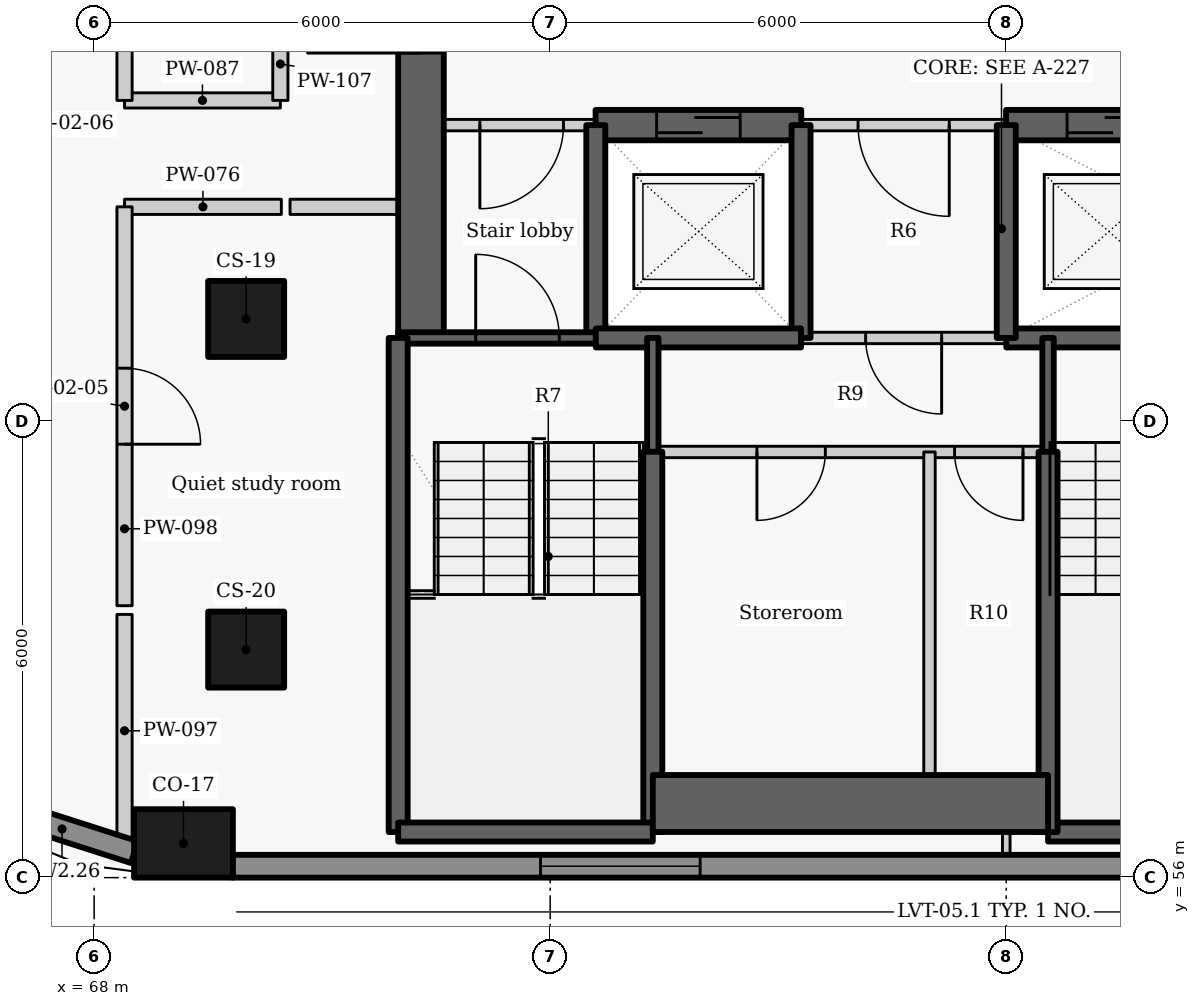
"""IFC4 building model, lengths in metres.
Left out: names, types, materials, properties, quantities, classifications, styles, units other than length and angle.
Written with IfcOpenShell. Run it as: python <this file> out.ifc"""

import sys

from ifc_helpers import new_model, si_unit, direction, frame, frame_2d, origin, origin_2d, place, context, subcontext, project, spatial, rectangle, extrude, element, fill, save


model = new_model("IFC4")
c1 = context("Model", 3, precision=1e-05, world=origin(), true_north=direction((0.0, 1.0)))
c2 = subcontext(c1, "Body", "Model", "MODEL_VIEW")
j1 = project(units=[si_unit("LENGTHUNIT", "METRE"), si_unit("PLANEANGLEUNIT", "RADIAN")], contexts=[c1])
p1 = place(None, origin())
s1 = spatial("IfcSite", under=j1, at=p1, CompositionType="ELEMENT")
p2 = place(p1, origin())
s2 = spatial("IfcBuilding", under=s1, at=p2, CompositionType="ELEMENT")
p3 = place(p2, frame((0.0, 0.0, 150.3)))
s3 = spatial("IfcBuildingStorey", under=s2, at=p3, CompositionType="ELEMENT", Elevation=150.3)
p4 = place(p3, frame((69.175, 56.45, 0.0), z_axis=(0.0, 0.0, 1.0), x_axis=(1.0, 0.0, 0.0)))
e1 = element("IfcColumn", 1, at=p4, inside=s3, PredefinedType="COLUMN", context=c2, shape_type="SweptSolid", body=[
    extrude(rectangle(XDim=1.3, YDim=0.9, at=origin_2d()), origin(), (0.0, 0.0, 1.0), 3.3),
])
for number, where, z_axis, x_axis in (
    (2, (70.0, 63.35, 0.0), (0.0, 0.0, 1.0), (0.0, -1.0, 0.0)),
    (3, (70.0, 59.0, 0.0), (0.0, 0.0, 1.0), (0.0, -1.0, 0.0)),
):
    element("IfcColumn", number, at=place(p3, frame(where, z_axis=z_axis, x_axis=x_axis)), inside=s3, PredefinedType="COLUMN", context=c2, shape_type="SweptSolid", body=[
        extrude(rectangle(XDim=1.0, YDim=1.0, at=origin_2d()), origin(), (0.0, 0.0, 1.0), 3.3),
    ])
p5 = place(p3, frame((66.626, 56.946, 0.0), z_axis=(0.0, 0.0, 1.0), x_axis=(0.952201240673, -0.305471434444, 0.0)))
e4 = element("IfcWall", 4, at=p5, inside=s3, PredefinedType="SOLIDWALL", context=c2, shape_type="SweptSolid", body=[
    extrude(rectangle(XDim=1.999, YDim=0.3, at=frame_2d((1.0, 0.0))), origin(), (0.0, 0.0, 1.0), 2.425),
])
p6 = place(p3, frame((69.821, 56.15, 0.0), z_axis=(0.0, 0.0, 1.0), x_axis=(1.0, 0.0, 0.0)))
e5 = element("IfcWall", 5, at=p6, inside=s3, PredefinedType="SOLIDWALL", context=c2, shape_type="SweptSolid", body=[
    extrude(rectangle(XDim=20.04, YDim=0.3, at=frame_2d((10.02, 0.0))), origin(), (0.0, 0.0, 1.0), 2.425),
])
p7 = place(p6, frame((4.051, 0.0, 0.9)))
e6 = element("IfcOpeningElement", 6, at=p7, cuts=e5, PredefinedType="OPENING", context=c2, shape_type="SweptSolid", body=[
    extrude(rectangle(XDim=2.1, YDim=1.1, at=frame_2d((1.05, 0.55))), frame((0.0, 0.16, 0.0), z_axis=(0.0, -1.0, 0.0), x_axis=(1.0, 0.0, 0.0)), (0.0, 0.0, 1.0), 0.32),
])
p8 = place(p6, frame((14.047, 0.0, 0.9)))
e7 = element("IfcOpeningElement", 7, at=p8, cuts=e5, PredefinedType="OPENING", context=c2, shape_type="SweptSolid", body=[
    extrude(rectangle(XDim=2.1, YDim=1.1, at=frame_2d((1.05, 0.55))), frame((0.0, 0.16, 0.0), z_axis=(0.0, -1.0, 0.0), x_axis=(1.0, 0.0, 0.0)), (0.0, 0.0, 1.0), 0.32),
])
p9 = place(p3, frame((72.3, 63.1, -0.275), z_axis=(0.0, 0.0, 1.0), x_axis=(0.0, 1.0, 0.0)))
e8 = element("IfcWall", 8, at=p9, inside=s3, PredefinedType="SHEAR", context=c2, shape_type="SweptSolid", body=[
    extrude(rectangle(XDim=9.1, YDim=0.6, at=frame_2d((4.55, 0.0))), origin(), (0.0, 0.0, 1.0), 3.3),
])
p10 = place(p9, frame((3.748, 0.0, 0.275)))
e9 = element("IfcOpeningElement", 9, at=p10, cuts=e8, PredefinedType="OPENING", context=c2, shape_type="SweptSolid", body=[
    extrude(rectangle(XDim=1.5, YDim=2.1, at=frame_2d((0.75, 1.05))), frame((0.0, 0.31, 0.0), z_axis=(0.0, -1.0, 0.0), x_axis=(1.0, 0.0, 0.0)), (0.0, 0.0, 1.0), 0.62),
])
p11 = place(p3, frame((74.603, 65.9, 0.0), z_axis=(0.0, 0.0, 1.0), x_axis=(-1.0, 0.0, 0.0)))
e10 = element("IfcWall", 10, at=p11, inside=s3, PredefinedType="PARTITIONING", context=c2, shape_type="SweptSolid", body=[
    extrude(rectangle(XDim=2.603, YDim=0.15, at=frame_2d((1.302, 0.0))), origin(), (0.0, 0.0, 1.0), 3.025),
])
p12 = place(p11, frame((0.428, 0.0, 0.0)))
e11 = element("IfcOpeningElement", 11, at=p12, cuts=e10, PredefinedType="OPENING", context=c2, shape_type="SweptSolid", body=[
    extrude(rectangle(XDim=1.1, YDim=2.1, at=frame_2d((0.55, 1.05))), frame((0.0, 0.085, 0.0), z_axis=(0.0, -1.0, 0.0), x_axis=(1.0, 0.0, 0.0)), (0.0, 0.0, 1.0), 0.17),
])
p13 = place(p3, frame((80.003, 65.9, 0.0), z_axis=(0.0, 0.0, 1.0), x_axis=(-1.0, 0.0, 0.0)))
e12 = element("IfcWall", 12, at=p13, inside=s3, PredefinedType="PARTITIONING", context=c2, shape_type="SweptSolid", body=[
    extrude(rectangle(XDim=2.706, YDim=0.15, at=frame_2d((1.353, 0.0))), origin(), (0.0, 0.0, 1.0), 3.025),
])
p14 = place(p13, frame((0.753, 0.0, 0.0)))
e13 = element("IfcOpeningElement", 13, at=p14, cuts=e12, PredefinedType="OPENING", context=c2, shape_type="SweptSolid", body=[
    extrude(rectangle(XDim=1.2, YDim=2.1, at=frame_2d((0.6, 1.05))), frame((0.0, 0.085, 0.0), z_axis=(0.0, -1.0, 0.0), x_axis=(1.0, 0.0, 0.0)), (0.0, 0.0, 1.0), 0.17),
])
p15 = place(p3, frame((74.597, 65.9, -0.275), z_axis=(0.0, 0.0, 1.0), x_axis=(1.0, 0.0, 0.0)))
e14 = element("IfcWall", 14, at=p15, inside=s3, PredefinedType="SHEAR", context=c2, shape_type="SweptSolid", body=[
    extrude(rectangle(XDim=2.706, YDim=0.4, at=frame_2d((1.353, 0.0))), origin(), (0.0, 0.0, 1.0), 3.3),
])
p16 = place(p15, frame((0.803, 0.0, 0.275)))
e15 = element("IfcOpeningElement", 15, at=p16, cuts=e14, PredefinedType="OPENING", context=c2, shape_type="SweptSolid", body=[
    extrude(rectangle(XDim=1.1, YDim=2.1, at=frame_2d((0.55, 1.05))), frame((0.0, 0.21, 0.0), z_axis=(0.0, -1.0, 0.0), x_axis=(1.0, 0.0, 0.0)), (0.0, 0.0, 1.0), 0.42),
])
p17 = place(p3, frame((79.997, 65.9, -0.275), z_axis=(0.0, 0.0, 1.0), x_axis=(1.0, 0.0, 0.0)))
e16 = element("IfcWall", 16, at=p17, inside=s3, PredefinedType="SHEAR", context=c2, shape_type="SweptSolid", body=[
    extrude(rectangle(XDim=5.406, YDim=0.4, at=frame_2d((2.703, 0.0))), origin(), (0.0, 0.0, 1.0), 3.3),
])
p18 = place(p17, frame((0.803, 0.0, 0.275)))
e17 = element("IfcOpeningElement", 17, at=p18, cuts=e16, PredefinedType="OPENING", context=c2, shape_type="SweptSolid", body=[
    extrude(rectangle(XDim=1.1, YDim=2.1, at=frame_2d((0.55, 1.05))), frame((0.0, 0.21, 0.0), z_axis=(0.0, -1.0, 0.0), x_axis=(1.0, 0.0, 0.0)), (0.0, 0.0, 1.0), 0.42),
])
p19 = place(p3, frame((74.6, 63.1, -0.275), z_axis=(0.0, 0.0, 1.0), x_axis=(0.0, 1.0, 0.0)))
e18 = element("IfcWall", 18, at=p19, inside=s3, PredefinedType="SHEAR", context=c2, shape_type="SweptSolid", body=[
    extrude(rectangle(XDim=2.8, YDim=0.25, at=frame_2d((1.4, 0.0))), origin(), (0.0, 0.0, 1.0), 3.3),
])
p20 = place(p3, frame((72.0, 63.1, -0.275), z_axis=(0.0, 0.0, 1.0), x_axis=(1.0, 0.0, 0.0)))
e19 = element("IfcWall", 19, at=p20, inside=s3, PredefinedType="SHEAR", context=c2, shape_type="SweptSolid", body=[
    extrude(rectangle(XDim=2.6, YDim=0.15, at=frame_2d((1.3, 0.0))), origin(), (0.0, 0.0, 1.0), 3.3),
])
p21 = place(p20, frame((1.02, 0.0, 0.275)))
e20 = element("IfcOpeningElement", 20, at=p21, cuts=e19, PredefinedType="OPENING", context=c2, shape_type="SweptSolid", body=[
    extrude(rectangle(XDim=1.1, YDim=2.1, at=frame_2d((0.55, 1.05))), frame((0.0, 0.085, 0.0), z_axis=(0.0, -1.0, 0.0), x_axis=(1.0, 0.0, 0.0)), (0.0, 0.0, 1.0), 0.17),
])
p22 = place(p3, frame((77.3, 63.1, -0.275), z_axis=(0.0, 0.0, 1.0), x_axis=(0.0, 1.0, 0.0)))
e21 = element("IfcWall", 21, at=p22, inside=s3, PredefinedType="SHEAR", context=c2, shape_type="SweptSolid", body=[
    extrude(rectangle(XDim=2.8, YDim=0.25, at=frame_2d((1.4, 0.0))), origin(), (0.0, 0.0, 1.0), 3.3),
])
p23 = place(p3, frame((74.6, 63.1, -0.275), z_axis=(0.0, 0.0, 1.0), x_axis=(1.0, 0.0, 0.0)))
e22 = element("IfcWall", 22, at=p23, inside=s3, PredefinedType="SHEAR", context=c2, shape_type="SweptSolid", body=[
    extrude(rectangle(XDim=2.7, YDim=0.25, at=frame_2d((1.35, 0.0))), origin(), (0.0, 0.0, 1.0), 3.3),
])
p24 = place(p3, frame((80.0, 63.1, -0.275), z_axis=(0.0, 0.0, 1.0), x_axis=(1.0, 0.0, 0.0)))
e23 = element("IfcWall", 23, at=p24, inside=s3, PredefinedType="SHEAR", context=c2, shape_type="SweptSolid", body=[
    extrude(rectangle(XDim=8.0, YDim=0.25, at=frame_2d((4.0, 0.0))), origin(), (0.0, 0.0, 1.0), 3.3),
])
p25 = place(p24, frame((3.849, 0.0, 0.275)))
e24 = element("IfcOpeningElement", 24, at=p25, cuts=e23, PredefinedType="OPENING", context=c2, shape_type="SweptSolid", body=[
    extrude(rectangle(XDim=1.1, YDim=2.1, at=frame_2d((0.55, 1.05))), frame((0.0, 0.135, 0.0), z_axis=(0.0, -1.0, 0.0), x_axis=(1.0, 0.0, 0.0)), (0.0, 0.0, 1.0), 0.27),
])
p26 = place(p3, frame((80.0, 63.1, -0.275), z_axis=(0.0, 0.0, 1.0), x_axis=(0.0, 1.0, 0.0)))
e25 = element("IfcWall", 25, at=p26, inside=s3, PredefinedType="SHEAR", context=c2, shape_type="SweptSolid", body=[
    extrude(rectangle(XDim=2.8, YDim=0.25, at=frame_2d((1.4, 0.0))), origin(), (0.0, 0.0, 1.0), 3.3),
])
p27 = place(p3, frame((80.0, 63.1, 0.0), z_axis=(0.0, 0.0, 1.0), x_axis=(-1.0, 0.0, 0.0)))
e26 = element("IfcWall", 26, at=p27, inside=s3, PredefinedType="PARTITIONING", context=c2, shape_type="SweptSolid", body=[
    extrude(rectangle(XDim=2.7, YDim=0.15, at=frame_2d((1.35, 0.0))), origin(), (0.0, 0.0, 1.0), 3.025),
])
p28 = place(p27, frame((0.85, 0.0, 0.0)))
e27 = element("IfcOpeningElement", 27, at=p28, cuts=e26, PredefinedType="OPENING", context=c2, shape_type="SweptSolid", body=[
    extrude(rectangle(XDim=1.0, YDim=2.1, at=frame_2d((0.5, 1.05))), frame((0.0, 0.085, 0.0), z_axis=(0.0, -1.0, 0.0), x_axis=(1.0, 0.0, 0.0)), (0.0, 0.0, 1.0), 0.17),
])
p29 = place(p3, frame((75.35, 61.597, -0.275), z_axis=(0.0, 0.0, 1.0), x_axis=(0.0, 1.0, 0.0)))
e28 = element("IfcWall", 28, at=p29, inside=s3, PredefinedType="SHEAR", context=c2, shape_type="SweptSolid", body=[
    extrude(rectangle(XDim=1.503, YDim=0.15, at=frame_2d((0.751, 0.0))), origin(), (0.0, 0.0, 1.0), 3.3),
])
p30 = place(p3, frame((75.35, 56.6, -0.275), z_axis=(0.0, 0.0, 1.0), x_axis=(0.0, 1.0, 0.0)))
e29 = element("IfcWall", 29, at=p30, inside=s3, PredefinedType="SHEAR", context=c2, shape_type="SweptSolid", body=[
    extrude(rectangle(XDim=5.003, YDim=0.25, at=frame_2d((2.501, 0.0))), origin(), (0.0, 0.0, 1.0), 3.3),
])
p31 = place(p3, frame((72.0, 56.6, -0.275), z_axis=(0.0, 0.0, 1.0), x_axis=(0.0, 1.0, 0.0)))
e30 = element("IfcWall", 30, at=p31, inside=s3, PredefinedType="SHEAR", context=c2, shape_type="SweptSolid", body=[
    extrude(rectangle(XDim=6.5, YDim=0.25, at=frame_2d((3.25, 0.0))), origin(), (0.0, 0.0, 1.0), 3.3),
])
p32 = place(p3, frame((72.0, 56.6, -0.275), z_axis=(0.0, 0.0, 1.0), x_axis=(1.0, 0.0, 0.0)))
e31 = element("IfcWall", 31, at=p32, inside=s3, PredefinedType="SHEAR", context=c2, shape_type="SweptSolid", body=[
    extrude(rectangle(XDim=3.35, YDim=0.25, at=frame_2d((1.675, 0.0))), origin(), (0.0, 0.0, 1.0), 3.3),
])
p33 = place(p3, frame((80.55, 56.6, -0.275), z_axis=(0.0, 0.0, 1.0), x_axis=(1.0, 0.0, 0.0)))
e32 = element("IfcWall", 32, at=p33, inside=s3, PredefinedType="SHEAR", context=c2, shape_type="SweptSolid", body=[
    extrude(rectangle(XDim=2.85, YDim=0.25, at=frame_2d((1.425, 0.0))), origin(), (0.0, 0.0, 1.0), 3.3),
])
p34 = place(p3, frame((80.55, 61.597, -0.275), z_axis=(0.0, 0.0, 1.0), x_axis=(0.0, 1.0, 0.0)))
e33 = element("IfcWall", 33, at=p34, inside=s3, PredefinedType="SHEAR", context=c2, shape_type="SweptSolid", body=[
    extrude(rectangle(XDim=1.503, YDim=0.15, at=frame_2d((0.751, 0.0))), origin(), (0.0, 0.0, 1.0), 3.3),
])
p35 = place(p3, frame((80.55, 56.6, -0.275), z_axis=(0.0, 0.0, 1.0), x_axis=(0.0, 1.0, 0.0)))
e34 = element("IfcWall", 34, at=p35, inside=s3, PredefinedType="SHEAR", context=c2, shape_type="SweptSolid", body=[
    extrude(rectangle(XDim=5.003, YDim=0.25, at=frame_2d((2.501, 0.0))), origin(), (0.0, 0.0, 1.0), 3.3),
])
p36 = place(p3, frame((75.35, 56.975, -0.275), z_axis=(0.0, 0.0, 1.0), x_axis=(1.0, 0.0, 0.0)))
e35 = element("IfcWall", 35, at=p36, inside=s3, PredefinedType="SHEAR", context=c2, shape_type="SweptSolid", body=[
    extrude(rectangle(XDim=5.2, YDim=0.75, at=frame_2d((2.6, 0.0))), origin(), (0.0, 0.0, 1.0), 3.3),
])
p37 = place(p3, frame((80.55, 61.6, 0.0), z_axis=(0.0, 0.0, 1.0), x_axis=(-1.0, 0.0, 0.0)))
e36 = element("IfcWall", 36, at=p37, inside=s3, PredefinedType="PARTITIONING", context=c2, shape_type="SweptSolid", body=[
    extrude(rectangle(XDim=5.2, YDim=0.15, at=frame_2d((2.6, 0.0))), origin(), (0.0, 0.0, 1.0), 3.025),
])
p38 = place(p37, frame((2.93, 0.0, 0.0)))
e37 = element("IfcOpeningElement", 37, at=p38, cuts=e36, PredefinedType="OPENING", context=c2, shape_type="SweptSolid", body=[
    extrude(rectangle(XDim=0.9, YDim=2.1, at=frame_2d((0.45, 1.05))), frame((0.0, 0.085, 0.0), z_axis=(0.0, -1.0, 0.0), x_axis=(1.0, 0.0, 0.0)), (0.0, 0.0, 1.0), 0.17),
])
p39 = place(p37, frame((0.33, 0.0, 0.0)))
e38 = element("IfcOpeningElement", 38, at=p39, cuts=e36, PredefinedType="OPENING", context=c2, shape_type="SweptSolid", body=[
    extrude(rectangle(XDim=0.9, YDim=2.1, at=frame_2d((0.45, 1.05))), frame((0.0, 0.085, 0.0), z_axis=(0.0, -1.0, 0.0), x_axis=(1.0, 0.0, 0.0)), (0.0, 0.0, 1.0), 0.17),
])
p40 = place(p3, frame((78.99, 56.6, 0.0), z_axis=(0.0, 0.0, 1.0), x_axis=(0.0, 1.0, 0.0)))
e39 = element("IfcWall", 39, at=p40, inside=s3, PredefinedType="PARTITIONING", context=c2, shape_type="SweptSolid", body=[
    extrude(rectangle(XDim=5.0, YDim=0.15, at=frame_2d((2.5, 0.0))), origin(), (0.0, 0.0, 1.0), 3.025),
])
p41 = place(p3, frame((68.4, 64.825, 0.0), z_axis=(0.0, 0.0, 1.0), x_axis=(1.0, 0.0, 0.0)))
e40 = element("IfcWall", 40, at=p41, inside=s3, PredefinedType="PARTITIONING", context=c2, shape_type="SweptSolid", body=[
    extrude(rectangle(XDim=2.063, YDim=0.2, at=frame_2d((1.031, 0.0))), origin(), (0.0, 0.0, 1.0), 2.505),
])
p42 = place(p3, frame((70.577, 64.825, 0.0), z_axis=(0.0, 0.0, 1.0), x_axis=(1.0, 0.0, 0.0)))
e41 = element("IfcWall", 41, at=p42, inside=s3, PredefinedType="PARTITIONING", context=c2, shape_type="SweptSolid", body=[
    extrude(rectangle(XDim=1.423, YDim=0.2, at=frame_2d((0.711, 0.0))), origin(), (0.0, 0.0, 1.0), 3.025),
])
p43 = place(p3, frame((68.4, 66.225, 0.0), z_axis=(0.0, 0.0, 1.0), x_axis=(1.0, 0.0, 0.0)))
e42 = element("IfcWall", 42, at=p43, inside=s3, PredefinedType="PARTITIONING", context=c2, shape_type="SweptSolid", body=[
    extrude(rectangle(XDim=2.05, YDim=0.2, at=frame_2d((1.025, 0.0))), origin(), (0.0, 0.0, 1.0), 2.505),
])
p44 = place(p3, frame((68.4, 56.401, 0.0), z_axis=(0.0, 0.0, 1.0), x_axis=(0.0, 1.0, 0.0)))
e43 = element("IfcWall", 43, at=p44, inside=s3, PredefinedType="PARTITIONING", context=c2, shape_type="SweptSolid", body=[
    extrude(rectangle(XDim=3.062, YDim=0.2, at=frame_2d((1.531, 0.0))), origin(), (0.0, 0.0, 1.0), 2.405),
])
p45 = place(p3, frame((68.4, 64.825, 0.0), z_axis=(0.0, 0.0, 1.0), x_axis=(0.0, -1.0, 0.0)))
e44 = element("IfcWall", 44, at=p45, inside=s3, PredefinedType="PARTITIONING", context=c2, shape_type="SweptSolid", body=[
    extrude(rectangle(XDim=5.248, YDim=0.2, at=frame_2d((2.624, 0.0))), origin(), (0.0, 0.0, 1.0), 3.025),
])
p46 = place(p45, frame((2.123, 0.0, 0.0)))
e45 = element("IfcOpeningElement", 45, at=p46, cuts=e44, PredefinedType="OPENING", context=c2, shape_type="SweptSolid", body=[
    extrude(rectangle(XDim=1.0, YDim=2.1, at=frame_2d((0.5, 1.05))), frame((0.0, 0.11, 0.0), z_axis=(0.0, -1.0, 0.0), x_axis=(1.0, 0.0, 0.0)), (0.0, 0.0, 1.0), 0.22),
])
p47 = place(p3, frame((68.4, 72.513, 0.0), z_axis=(0.0, 0.0, 1.0), x_axis=(0.0, -1.0, 0.0)))
e46 = element("IfcWall", 46, at=p47, inside=s3, PredefinedType="PARTITIONING", context=c2, shape_type="SweptSolid", body=[
    extrude(rectangle(XDim=6.288, YDim=0.2, at=frame_2d((3.144, 0.0))), origin(), (0.0, 0.0, 1.0), 3.025),
])
p48 = place(p47, frame((2.645, 0.0, 0.0)))
e47 = element("IfcOpeningElement", 47, at=p48, cuts=e46, PredefinedType="OPENING", context=c2, shape_type="SweptSolid", body=[
    extrude(rectangle(XDim=1.0, YDim=2.1, at=frame_2d((0.5, 1.05))), frame((0.0, 0.11, 0.0), z_axis=(0.0, -1.0, 0.0), x_axis=(1.0, 0.0, 0.0)), (0.0, 0.0, 1.0), 0.22),
])
p49 = place(p3, frame((70.45, 66.225, 0.0), z_axis=(0.0, 0.0, 1.0), x_axis=(0.0, 1.0, 0.0)))
e48 = element("IfcWall", 48, at=p49, inside=s3, PredefinedType="PARTITIONING", context=c2, shape_type="SweptSolid", body=[
    extrude(rectangle(XDim=0.958, YDim=0.2, at=frame_2d((0.479, 0.0))), origin(), (0.0, 0.0, 1.0), 3.025),
])
p50 = place(p3, frame((80.0, 56.3, 0.0), z_axis=(0.0, 0.0, 1.0), x_axis=(0.0, 1.0, 0.0)))
e49 = element("IfcWall", 49, at=p50, inside=s3, PredefinedType="PARTITIONING", context=c2, shape_type="SweptSolid", body=[
    extrude(rectangle(XDim=0.3, YDim=0.1, at=frame_2d((0.15, 0.0))), origin(), (0.0, 0.0, 1.0), 3.025),
])
p51 = place(p7, origin())
e50 = element("IfcWindow", 50, at=p51, inside=s3, PartitioningType="SINGLE_PANEL", PredefinedType="WINDOW", context=c2, shape_type="SweptSolid", body=[
    extrude(rectangle(XDim=2.1, YDim=1.1, at=frame_2d((1.05, 0.55))), frame((0.0, 0.03, 0.0), z_axis=(0.0, -1.0, 0.0), x_axis=(1.0, 0.0, 0.0)), (0.0, 0.0, 1.0), 0.06),
])
fill(e6, e50)
p52 = place(p12, origin())
e51 = element("IfcDoor", 51, at=p52, inside=s3, OperationType="SINGLE_SWING_RIGHT", PredefinedType="DOOR", context=c2, shape_type="SweptSolid", body=[
    extrude(rectangle(XDim=1.1, YDim=2.1, at=frame_2d((0.55, 1.05))), frame((0.0, 0.025, 0.0), z_axis=(0.0, -1.0, 0.0), x_axis=(1.0, 0.0, 0.0)), (0.0, 0.0, 1.0), 0.05),
])
fill(e11, e51)
p53 = place(p16, origin())
e52 = element("IfcDoor", 52, at=p53, inside=s3, OperationType="SLIDING_TO_LEFT", PredefinedType="DOOR", context=c2, shape_type="SweptSolid", body=[
    extrude(rectangle(XDim=1.1, YDim=2.1, at=frame_2d((0.55, 1.05))), frame((0.0, 0.025, 0.0), z_axis=(0.0, -1.0, 0.0), x_axis=(1.0, 0.0, 0.0)), (0.0, 0.0, 1.0), 0.05),
])
fill(e15, e52)
p54 = place(p14, origin())
e53 = element("IfcDoor", 53, at=p54, inside=s3, OperationType="DOUBLE_DOOR_SINGLE_SWING", PredefinedType="DOOR", context=c2, shape_type="SweptSolid", body=[
    extrude(rectangle(XDim=1.2, YDim=2.1, at=frame_2d((0.6, 1.05))), frame((0.0, 0.025, 0.0), z_axis=(0.0, -1.0, 0.0), x_axis=(1.0, 0.0, 0.0)), (0.0, 0.0, 1.0), 0.05),
])
fill(e13, e53)
p55 = place(p18, origin())
e54 = element("IfcDoor", 54, at=p55, inside=s3, OperationType="SLIDING_TO_LEFT", PredefinedType="DOOR", context=c2, shape_type="SweptSolid", body=[
    extrude(rectangle(XDim=1.1, YDim=2.1, at=frame_2d((0.55, 1.05))), frame((0.0, 0.025, 0.0), z_axis=(0.0, -1.0, 0.0), x_axis=(1.0, 0.0, 0.0)), (0.0, 0.0, 1.0), 0.05),
])
fill(e17, e54)
p56 = place(p28, origin())
e55 = element("IfcDoor", 55, at=p56, inside=s3, OperationType="SINGLE_SWING_LEFT", PredefinedType="DOOR", context=c2, shape_type="SweptSolid", body=[
    extrude(rectangle(XDim=1.0, YDim=2.1, at=frame_2d((0.5, 1.05))), frame((0.0, 0.025, 0.0), z_axis=(0.0, -1.0, 0.0), x_axis=(1.0, 0.0, 0.0)), (0.0, 0.0, 1.0), 0.05),
])
fill(e27, e55)
p57 = place(p38, origin())
e56 = element("IfcDoor", 56, at=p57, inside=s3, OperationType="SINGLE_SWING_RIGHT", PredefinedType="DOOR", context=c2, shape_type="SweptSolid", body=[
    extrude(rectangle(XDim=0.9, YDim=2.1, at=frame_2d((0.45, 1.05))), frame((0.0, 0.025, 0.0), z_axis=(0.0, -1.0, 0.0), x_axis=(1.0, 0.0, 0.0)), (0.0, 0.0, 1.0), 0.05),
])
fill(e37, e56)
p58 = place(p39, origin())
e57 = element("IfcDoor", 57, at=p58, inside=s3, OperationType="SINGLE_SWING_LEFT", PredefinedType="DOOR", context=c2, shape_type="SweptSolid", body=[
    extrude(rectangle(XDim=0.9, YDim=2.1, at=frame_2d((0.45, 1.05))), frame((0.0, 0.025, 0.0), z_axis=(0.0, -1.0, 0.0), x_axis=(1.0, 0.0, 0.0)), (0.0, 0.0, 1.0), 0.05),
])
fill(e38, e57)
p59 = place(p21, origin())
e58 = element("IfcDoor", 58, at=p59, inside=s3, OperationType="SINGLE_SWING_LEFT", PredefinedType="DOOR", context=c2, shape_type="SweptSolid", body=[
    extrude(rectangle(XDim=1.1, YDim=2.1, at=frame_2d((0.55, 1.05))), frame((0.0, 0.025, 0.0), z_axis=(0.0, -1.0, 0.0), x_axis=(1.0, 0.0, 0.0)), (0.0, 0.0, 1.0), 0.05),
])
fill(e20, e58)
p60 = place(p46, origin())
e59 = element("IfcDoor", 59, at=p60, inside=s3, OperationType="SINGLE_SWING_RIGHT", PredefinedType="DOOR", context=c2, shape_type="SweptSolid", body=[
    extrude(rectangle(XDim=1.0, YDim=2.1, at=frame_2d((0.5, 1.05))), frame((0.0, 0.025, 0.0), z_axis=(0.0, -1.0, 0.0), x_axis=(1.0, 0.0, 0.0)), (0.0, 0.0, 1.0), 0.05),
])
fill(e45, e59)
p61 = place(p10, origin())
e60 = element("IfcDoor", 60, at=p61, inside=s3, OperationType="DOUBLE_DOOR_SINGLE_SWING", PredefinedType="DOOR", context=c2, shape_type="SweptSolid", body=[
    extrude(rectangle(XDim=1.5, YDim=2.1, at=frame_2d((0.75, 1.05))), frame((0.0, 0.025, 0.0), z_axis=(0.0, -1.0, 0.0), x_axis=(1.0, 0.0, 0.0)), (0.0, 0.0, 1.0), 0.05),
])
fill(e9, e60)
save(model, sys.argv[1])
